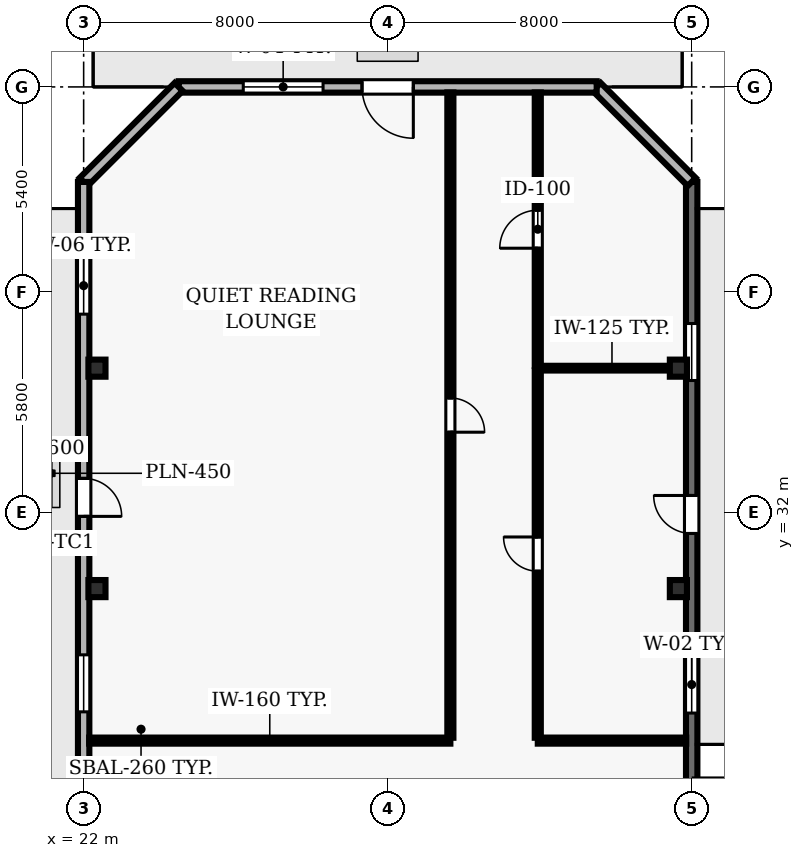
"""IFC4 building model, lengths in metres.
Left out: names, types, materials, properties, quantities, classifications, styles, units other than length and angle.
Written with IfcOpenShell. Run it as: python <this file> out.ifc"""

import sys

from ifc_helpers import new_model, si_unit, direction, frame, frame_2d, origin, origin_2d, place, context, subcontext, project, spatial, rectangle, hollow_rectangle, extrude, element, fill, save


model = new_model("IFC4")
c1 = context("Model", 3, precision=1e-05, world=origin(), true_north=direction((0.0, 1.0)))
c2 = subcontext(c1, "Body", "Model", "MODEL_VIEW")
j1 = project(units=[si_unit("LENGTHUNIT", "METRE"), si_unit("PLANEANGLEUNIT", "RADIAN")], contexts=[c1])
p1 = place(None, origin())
s1 = spatial("IfcSite", under=j1, at=p1, CompositionType="ELEMENT")
p2 = place(p1, origin())
s2 = spatial("IfcBuilding", under=s1, at=p2, CompositionType="ELEMENT")
p3 = place(p2, frame((0.0, 0.0, 170.8)))
s3 = spatial("IfcBuildingStorey", under=s2, at=p3, CompositionType="ELEMENT", Elevation=170.8)
for number, where, z_axis, x_axis in (
    (1, (22.35, 30.0, 0.0), (0.0, 0.0, 1.0), (1.0, 0.0, 0.0)),
    (2, (37.65, 30.0, 0.0), (0.0, 0.0, 1.0), (1.0, 0.0, 0.0)),
    (3, (22.35, 35.8, 0.0), (0.0, 0.0, 1.0), (1.0, 0.0, 0.0)),
    (4, (37.65, 35.8, 0.0), (0.0, 0.0, 1.0), (1.0, 0.0, 0.0)),
):
    element("IfcColumn", number, at=place(p3, frame(where, z_axis=z_axis, x_axis=x_axis)), inside=s3, PredefinedType="COLUMN", context=c2, shape_type="SweptSolid", body=[
        extrude(hollow_rectangle(XDim=0.45, YDim=0.45, WallThickness=0.02, at=origin_2d()), origin(), (0.0, 0.0, 1.0), 5.0),
    ])
p4 = place(p3, frame((38.0, 24.0, 0.0), z_axis=(0.0, 0.0, 1.0), x_axis=(0.0, 1.0, 0.0)))
e5 = element("IfcWall", 5, at=p4, inside=s3, PredefinedType="SOLIDWALL", context=c2, shape_type="SweptSolid", body=[
    extrude(rectangle(XDim=16.7, YDim=0.3, at=frame_2d((8.35, 0.0))), origin(), (0.0, 0.0, 1.0), 4.79),
])
p5 = place(p4, frame((7.45, 0.0, 0.0)))
e6 = element("IfcOpeningElement", 6, at=p5, cuts=e5, PredefinedType="OPENING", context=c2, shape_type="SweptSolid", body=[
    extrude(rectangle(XDim=1.0, YDim=2.2, at=frame_2d((0.5, 1.1))), frame((0.0, 0.16, 0.0), z_axis=(0.0, -1.0, 0.0), x_axis=(1.0, 0.0, 0.0)), (0.0, 0.0, 1.0), 0.32),
])
p6 = place(p4, frame((2.725, 0.0, 0.9)))
e7 = element("IfcOpeningElement", 7, at=p6, cuts=e5, PredefinedType="OPENING", context=c2, shape_type="SweptSolid", body=[
    extrude(rectangle(XDim=1.5, YDim=1.6, at=frame_2d((0.75, 0.8))), frame((0.0, 0.16, 0.0), z_axis=(0.0, -1.0, 0.0), x_axis=(1.0, 0.0, 0.0)), (0.0, 0.0, 1.0), 0.32),
])
p7 = place(p4, frame((11.475, 0.0, 0.9)))
e8 = element("IfcOpeningElement", 8, at=p7, cuts=e5, PredefinedType="OPENING", context=c2, shape_type="SweptSolid", body=[
    extrude(rectangle(XDim=1.5, YDim=1.6, at=frame_2d((0.75, 0.8))), frame((0.0, 0.16, 0.0), z_axis=(0.0, -1.0, 0.0), x_axis=(1.0, 0.0, 0.0)), (0.0, 0.0, 1.0), 0.32),
])
p8 = place(p3, frame((38.0, 40.7, 0.0), z_axis=(0.0, 0.0, 1.0), x_axis=(-0.707106781187, 0.707106781187, 0.0)))
e9 = element("IfcWall", 9, at=p8, inside=s3, PredefinedType="SOLIDWALL", context=c2, shape_type="SweptSolid", body=[
    extrude(rectangle(XDim=3.536, YDim=0.3, at=frame_2d((1.768, 0.0))), origin(), (0.0, 0.0, 1.0), 4.79),
])
p9 = place(p3, frame((35.5, 43.2, 0.0), z_axis=(0.0, 0.0, 1.0), x_axis=(-1.0, 0.0, 0.0)))
e10 = element("IfcWall", 10, at=p9, inside=s3, PredefinedType="SOLIDWALL", context=c2, shape_type="SweptSolid", body=[
    extrude(rectangle(XDim=11.0, YDim=0.3, at=frame_2d((5.5, 0.0))), origin(), (0.0, 0.0, 1.0), 4.79),
])
p10 = place(p9, frame((4.825, 0.0, 0.0)))
e11 = element("IfcOpeningElement", 11, at=p10, cuts=e10, PredefinedType="OPENING", context=c2, shape_type="SweptSolid", body=[
    extrude(rectangle(XDim=1.35, YDim=2.2, at=frame_2d((0.675, 1.1))), frame((0.0, 0.16, 0.0), z_axis=(0.0, -1.0, 0.0), x_axis=(1.0, 0.0, 0.0)), (0.0, 0.0, 1.0), 0.32),
])
p11 = place(p9, frame((7.2, 0.0, 0.9)))
e12 = element("IfcOpeningElement", 12, at=p11, cuts=e10, PredefinedType="OPENING", context=c2, shape_type="SweptSolid", body=[
    extrude(rectangle(XDim=2.1, YDim=1.6, at=frame_2d((1.05, 0.8))), frame((0.0, 0.16, 0.0), z_axis=(0.0, -1.0, 0.0), x_axis=(1.0, 0.0, 0.0)), (0.0, 0.0, 1.0), 0.32),
])
p12 = place(p3, frame((24.5, 43.2, 0.0), z_axis=(0.0, 0.0, 1.0), x_axis=(-0.707106781187, -0.707106781187, 0.0)))
e13 = element("IfcWall", 13, at=p12, inside=s3, PredefinedType="SOLIDWALL", context=c2, shape_type="SweptSolid", body=[
    extrude(rectangle(XDim=3.536, YDim=0.3, at=frame_2d((1.768, 0.0))), origin(), (0.0, 0.0, 1.0), 4.79),
])
p13 = place(p3, frame((22.0, 40.7, 0.0), z_axis=(0.0, 0.0, 1.0), x_axis=(0.0, -1.0, 0.0)))
e14 = element("IfcWall", 14, at=p13, inside=s3, PredefinedType="SOLIDWALL", context=c2, shape_type="SweptSolid", body=[
    extrude(rectangle(XDim=38.2, YDim=0.3, at=frame_2d((19.1, 0.0))), origin(), (0.0, 0.0, 1.0), 4.79),
])
p14 = place(p13, frame((7.8, 0.0, 0.0)))
e15 = element("IfcOpeningElement", 15, at=p14, cuts=e14, PredefinedType="OPENING", context=c2, shape_type="SweptSolid", body=[
    extrude(rectangle(XDim=1.0, YDim=2.2, at=frame_2d((0.5, 1.1))), frame((0.0, 0.16, 0.0), z_axis=(0.0, -1.0, 0.0), x_axis=(1.0, 0.0, 0.0)), (0.0, 0.0, 1.0), 0.32),
])
p15 = place(p13, frame((1.979, 0.0, 0.9)))
e16 = element("IfcOpeningElement", 16, at=p15, cuts=e14, PredefinedType="OPENING", context=c2, shape_type="SweptSolid", body=[
    extrude(rectangle(XDim=1.5, YDim=1.8, at=frame_2d((0.75, 0.9))), frame((0.0, 0.16, 0.0), z_axis=(0.0, -1.0, 0.0), x_axis=(1.0, 0.0, 0.0)), (0.0, 0.0, 1.0), 0.32),
])
p16 = place(p13, frame((12.443, 0.0, 0.9)))
e17 = element("IfcOpeningElement", 17, at=p16, cuts=e14, PredefinedType="OPENING", context=c2, shape_type="SweptSolid", body=[
    extrude(rectangle(XDim=1.5, YDim=1.8, at=frame_2d((0.75, 0.9))), frame((0.0, 0.16, 0.0), z_axis=(0.0, -1.0, 0.0), x_axis=(1.0, 0.0, 0.0)), (0.0, 0.0, 1.0), 0.32),
])
p17 = place(p13, frame((18.35, 0.0, 0.9)))
e18 = element("IfcOpeningElement", 18, at=p17, cuts=e14, PredefinedType="OPENING", context=c2, shape_type="SweptSolid", body=[
    extrude(rectangle(XDim=1.5, YDim=1.8, at=frame_2d((0.75, 0.9))), frame((0.0, 0.16, 0.0), z_axis=(0.0, -1.0, 0.0), x_axis=(1.0, 0.0, 0.0)), (0.0, 0.0, 1.0), 0.32),
])
p18 = place(p13, frame((23.807, 0.0, 0.9)))
e19 = element("IfcOpeningElement", 19, at=p18, cuts=e14, PredefinedType="OPENING", context=c2, shape_type="SweptSolid", body=[
    extrude(rectangle(XDim=1.5, YDim=1.8, at=frame_2d((0.75, 0.9))), frame((0.0, 0.16, 0.0), z_axis=(0.0, -1.0, 0.0), x_axis=(1.0, 0.0, 0.0)), (0.0, 0.0, 1.0), 0.32),
])
p19 = place(p13, frame((29.264, 0.0, 0.9)))
e20 = element("IfcOpeningElement", 20, at=p19, cuts=e14, PredefinedType="OPENING", context=c2, shape_type="SweptSolid", body=[
    extrude(rectangle(XDim=1.5, YDim=1.8, at=frame_2d((0.75, 0.9))), frame((0.0, 0.16, 0.0), z_axis=(0.0, -1.0, 0.0), x_axis=(1.0, 0.0, 0.0)), (0.0, 0.0, 1.0), 0.32),
])
p20 = place(p3, frame((31.65, 26.0, 0.0), z_axis=(0.0, 0.0, 1.0), x_axis=(-1.0, 0.0, 0.0)))
e21 = element("IfcWall", 21, at=p20, inside=s3, PredefinedType="PARTITIONING", context=c2, shape_type="SweptSolid", body=[
    extrude(rectangle(XDim=9.505, YDim=0.16, at=frame_2d((4.752, 0.0))), origin(), (0.0, 0.0, 1.0), 4.79),
])
p21 = place(p3, frame((37.855, 26.0, 0.0), z_axis=(0.0, 0.0, 1.0), x_axis=(-1.0, 0.0, 0.0)))
e22 = element("IfcWall", 22, at=p21, inside=s3, PredefinedType="PARTITIONING", context=c2, shape_type="SweptSolid", body=[
    extrude(rectangle(XDim=3.905, YDim=0.16, at=frame_2d((1.953, 0.0))), origin(), (0.0, 0.0, 1.0), 4.79),
])
p22 = place(p3, frame((37.855, 35.8, 0.0), z_axis=(0.0, 0.0, 1.0), x_axis=(-1.0, 0.0, 0.0)))
e23 = element("IfcWall", 23, at=p22, inside=s3, PredefinedType="PARTITIONING", context=c2, shape_type="SweptSolid", body=[
    extrude(rectangle(XDim=3.905, YDim=0.125, at=frame_2d((1.953, 0.0))), origin(), (0.0, 0.0, 1.0), 4.246),
])
p23 = place(p3, frame((31.65, 43.055, 0.0), z_axis=(0.0, 0.0, 1.0), x_axis=(0.0, -1.0, 0.0)))
e24 = element("IfcWall", 24, at=p23, inside=s3, PredefinedType="PARTITIONING", context=c2, shape_type="SweptSolid", body=[
    extrude(rectangle(XDim=16.98, YDim=0.16, at=frame_2d((8.49, 0.0))), origin(), (0.0, 0.0, 1.0), 4.79),
])
p24 = place(p23, frame((8.04, 0.0, 0.0)))
e25 = element("IfcOpeningElement", 25, at=p24, cuts=e24, PredefinedType="OPENING", context=c2, shape_type="SweptSolid", body=[
    extrude(rectangle(XDim=0.9, YDim=2.1, at=frame_2d((0.45, 1.05))), frame((0.0, 0.09, 0.0), z_axis=(0.0, -1.0, 0.0), x_axis=(1.0, 0.0, 0.0)), (0.0, 0.0, 1.0), 0.18),
])
p25 = place(p3, frame((33.95, 26.075, 0.0), z_axis=(0.0, 0.0, 1.0), x_axis=(0.0, 1.0, 0.0)))
e26 = element("IfcWall", 26, at=p25, inside=s3, PredefinedType="PARTITIONING", context=c2, shape_type="SweptSolid", body=[
    extrude(rectangle(XDim=9.667, YDim=0.16, at=frame_2d((4.833, 0.0))), origin(), (0.0, 0.0, 1.0), 4.79),
])
p26 = place(p25, frame((4.383, 0.0, 0.0)))
e27 = element("IfcOpeningElement", 27, at=p26, cuts=e26, PredefinedType="OPENING", context=c2, shape_type="SweptSolid", body=[
    extrude(rectangle(XDim=0.9, YDim=2.1, at=frame_2d((0.45, 1.05))), frame((0.0, 0.09, 0.0), z_axis=(0.0, -1.0, 0.0), x_axis=(1.0, 0.0, 0.0)), (0.0, 0.0, 1.0), 0.18),
])
p27 = place(p3, frame((33.95, 35.857, 0.0), z_axis=(0.0, 0.0, 1.0), x_axis=(0.0, 1.0, 0.0)))
e28 = element("IfcWall", 28, at=p27, inside=s3, PredefinedType="PARTITIONING", context=c2, shape_type="SweptSolid", body=[
    extrude(rectangle(XDim=7.198, YDim=0.16, at=frame_2d((3.599, 0.0))), origin(), (0.0, 0.0, 1.0), 4.79),
])
p28 = place(p27, frame((3.099, 0.0, 0.0)))
e29 = element("IfcOpeningElement", 29, at=p28, cuts=e28, PredefinedType="OPENING", context=c2, shape_type="SweptSolid", body=[
    extrude(rectangle(XDim=1.0, YDim=2.1, at=frame_2d((0.5, 1.05))), frame((0.0, 0.09, 0.0), z_axis=(0.0, -1.0, 0.0), x_axis=(1.0, 0.0, 0.0)), (0.0, 0.0, 1.0), 0.18),
])
p29 = place(p5, origin())
e30 = element("IfcDoor", 30, at=p29, inside=s3, OperationType="SINGLE_SWING_RIGHT", PredefinedType="DOOR", context=c2, shape_type="SweptSolid", body=[
    extrude(rectangle(XDim=1.0, YDim=2.2, at=frame_2d((0.5, 1.1))), frame((0.0, 0.025, 0.0), z_axis=(0.0, -1.0, 0.0), x_axis=(1.0, 0.0, 0.0)), (0.0, 0.0, 1.0), 0.05),
])
fill(e6, e30)
p30 = place(p6, origin())
e31 = element("IfcWindow", 31, at=p30, inside=s3, PartitioningType="SINGLE_PANEL", PredefinedType="WINDOW", context=c2, shape_type="SweptSolid", body=[
    extrude(rectangle(XDim=1.5, YDim=1.6, at=frame_2d((0.75, 0.8))), frame((0.0, 0.03, 0.0), z_axis=(0.0, -1.0, 0.0), x_axis=(1.0, 0.0, 0.0)), (0.0, 0.0, 1.0), 0.06),
])
fill(e7, e31)
p31 = place(p7, origin())
e32 = element("IfcWindow", 32, at=p31, inside=s3, PartitioningType="SINGLE_PANEL", PredefinedType="WINDOW", context=c2, shape_type="SweptSolid", body=[
    extrude(rectangle(XDim=1.5, YDim=1.6, at=frame_2d((0.75, 0.8))), frame((0.0, 0.03, 0.0), z_axis=(0.0, -1.0, 0.0), x_axis=(1.0, 0.0, 0.0)), (0.0, 0.0, 1.0), 0.06),
])
fill(e8, e32)
p32 = place(p10, origin())
e33 = element("IfcDoor", 33, at=p32, inside=s3, OperationType="SINGLE_SWING_LEFT", PredefinedType="DOOR", context=c2, shape_type="SweptSolid", body=[
    extrude(rectangle(XDim=1.35, YDim=2.2, at=frame_2d((0.675, 1.1))), frame((0.0, 0.025, 0.0), z_axis=(0.0, -1.0, 0.0), x_axis=(1.0, 0.0, 0.0)), (0.0, 0.0, 1.0), 0.05),
])
fill(e11, e33)
p33 = place(p11, origin())
e34 = element("IfcWindow", 34, at=p33, inside=s3, PartitioningType="SINGLE_PANEL", PredefinedType="WINDOW", context=c2, shape_type="SweptSolid", body=[
    extrude(rectangle(XDim=2.1, YDim=1.6, at=frame_2d((1.05, 0.8))), frame((0.0, 0.03, 0.0), z_axis=(0.0, -1.0, 0.0), x_axis=(1.0, 0.0, 0.0)), (0.0, 0.0, 1.0), 0.06),
])
fill(e12, e34)
p34 = place(p14, origin())
e35 = element("IfcDoor", 35, at=p34, inside=s3, OperationType="SINGLE_SWING_RIGHT", PredefinedType="DOOR", context=c2, shape_type="SweptSolid", body=[
    extrude(rectangle(XDim=1.0, YDim=2.2, at=frame_2d((0.5, 1.1))), frame((0.0, 0.025, 0.0), z_axis=(0.0, -1.0, 0.0), x_axis=(1.0, 0.0, 0.0)), (0.0, 0.0, 1.0), 0.05),
])
fill(e15, e35)
p35 = place(p15, origin())
e36 = element("IfcWindow", 36, at=p35, inside=s3, PartitioningType="SINGLE_PANEL", PredefinedType="WINDOW", context=c2, shape_type="SweptSolid", body=[
    extrude(rectangle(XDim=1.5, YDim=1.8, at=frame_2d((0.75, 0.9))), frame((0.0, 0.03, 0.0), z_axis=(0.0, -1.0, 0.0), x_axis=(1.0, 0.0, 0.0)), (0.0, 0.0, 1.0), 0.06),
])
fill(e16, e36)
p36 = place(p16, origin())
e37 = element("IfcWindow", 37, at=p36, inside=s3, PartitioningType="SINGLE_PANEL", PredefinedType="WINDOW", context=c2, shape_type="SweptSolid", body=[
    extrude(rectangle(XDim=1.5, YDim=1.8, at=frame_2d((0.75, 0.9))), frame((0.0, 0.03, 0.0), z_axis=(0.0, -1.0, 0.0), x_axis=(1.0, 0.0, 0.0)), (0.0, 0.0, 1.0), 0.06),
])
fill(e17, e37)
p37 = place(p26, origin())
e38 = element("IfcDoor", 38, at=p37, inside=s3, OperationType="SINGLE_SWING_RIGHT", PredefinedType="DOOR", context=c2, shape_type="SweptSolid", body=[
    extrude(rectangle(XDim=0.9, YDim=2.1, at=frame_2d((0.45, 1.05))), frame((0.0, 0.025, 0.0), z_axis=(0.0, -1.0, 0.0), x_axis=(1.0, 0.0, 0.0)), (0.0, 0.0, 1.0), 0.05),
])
fill(e27, e38)
p38 = place(p28, origin())
e39 = element("IfcDoor", 39, at=p38, inside=s3, OperationType="SINGLE_SWING_LEFT", PredefinedType="DOOR", context=c2, shape_type="SweptSolid", body=[
    extrude(rectangle(XDim=1.0, YDim=2.1, at=frame_2d((0.5, 1.05))), frame((0.0, 0.025, 0.0), z_axis=(0.0, -1.0, 0.0), x_axis=(1.0, 0.0, 0.0)), (0.0, 0.0, 1.0), 0.05),
])
fill(e29, e39)
p39 = place(p24, origin())
e40 = element("IfcDoor", 40, at=p39, inside=s3, OperationType="SINGLE_SWING_RIGHT", PredefinedType="DOOR", context=c2, shape_type="SweptSolid", body=[
    extrude(rectangle(XDim=0.9, YDim=2.1, at=frame_2d((0.45, 1.05))), frame((0.0, 0.025, 0.0), z_axis=(0.0, -1.0, 0.0), x_axis=(1.0, 0.0, 0.0)), (0.0, 0.0, 1.0), 0.05),
])
fill(e25, e40)
save(model, sys.argv[1])
